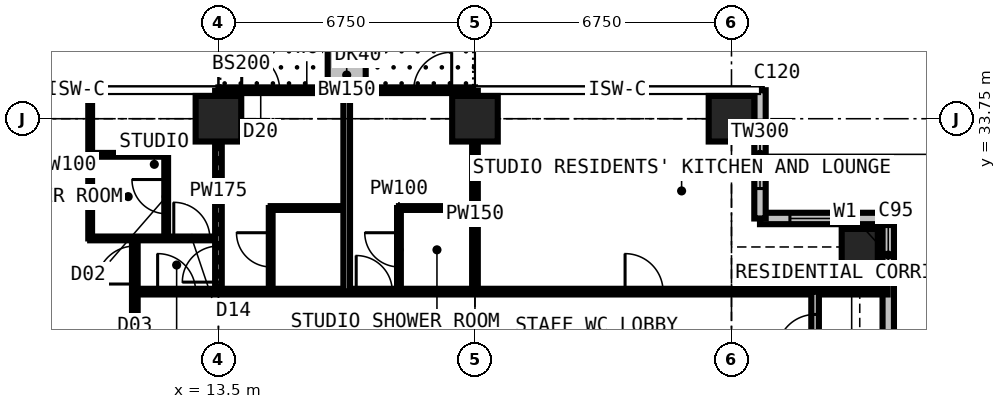
"""IFC4 building model, lengths in metres.
Left out: names, types, materials, properties, quantities, classifications, styles, units other than length and angle.
Written with IfcOpenShell. Run it as: python <this file> out.ifc"""

import sys

from ifc_helpers import new_model, si_unit, direction, frame, frame_2d, origin, origin_2d, place, context, subcontext, project, spatial, rectangle, extrude, element, fill, save


model = new_model("IFC4")
c1 = context("Model", 3, precision=1e-05, world=origin(), true_north=direction((0.0, 1.0)))
c2 = subcontext(c1, "Body", "Model", "MODEL_VIEW")
j1 = project(units=[si_unit("LENGTHUNIT", "METRE"), si_unit("PLANEANGLEUNIT", "RADIAN")], contexts=[c1])
p1 = place(None, origin())
s1 = spatial("IfcSite", under=j1, at=p1, CompositionType="ELEMENT")
p2 = place(p1, origin())
s2 = spatial("IfcBuilding", under=s1, at=p2, CompositionType="ELEMENT")
p3 = place(p2, frame((0.0, 0.0, 192.6)))
s3 = spatial("IfcBuildingStorey", under=s2, at=p3, CompositionType="ELEMENT", Elevation=192.6)
for number, where, z_axis, x_axis in (
    (1, (13.5, 33.75, 0.0), (0.0, 0.0, 1.0), (1.0, 0.0, 0.0)),
    (2, (20.25, 33.75, 0.0), (0.0, 0.0, 1.0), (1.0, 0.0, 0.0)),
    (3, (27.0, 33.75, 0.0), (0.0, 0.0, 1.0), (1.0, 0.0, 0.0)),
):
    element("IfcColumn", number, at=place(p3, frame(where, z_axis=z_axis, x_axis=x_axis)), inside=s3, PredefinedType="COLUMN", context=c2, shape_type="SweptSolid", body=[
        extrude(rectangle(XDim=1.2, YDim=1.2, at=origin_2d()), origin(), (0.0, 0.0, 1.0), 3.6),
    ])
p4 = place(p3, frame((30.375, 30.375, 0.0), z_axis=(0.0, 0.0, 1.0), x_axis=(1.0, 0.0, 0.0)))
e4 = element("IfcColumn", 4, at=p4, inside=s3, PredefinedType="COLUMN", context=c2, shape_type="SweptSolid", body=[
    extrude(rectangle(XDim=0.95, YDim=0.95, at=origin_2d()), origin(), (0.0, 0.0, 1.0), 3.6),
])
p5 = place(p3, frame((31.125, 27.75, 0.0), z_axis=(0.0, 0.0, 1.0), x_axis=(0.0, 1.0, 0.0)))
e5 = element("IfcWall", 5, at=p5, inside=s3, PredefinedType="SOLIDWALL", context=c2, shape_type="SweptSolid", body=[
    extrude(rectangle(XDim=3.375, YDim=0.3, at=frame_2d((1.688, 0.0))), origin(), (0.0, 0.0, 1.0), 3.375),
])
p6 = place(p5, frame((1.663, 0.0, 0.9)))
e6 = element("IfcOpeningElement", 6, at=p6, cuts=e5, PredefinedType="OPENING", context=c2, shape_type="SweptSolid", body=[
    extrude(rectangle(XDim=1.5, YDim=1.8, at=frame_2d((0.75, 0.9))), frame((0.0, 0.16, 0.0), z_axis=(0.0, -1.0, 0.0), x_axis=(1.0, 0.0, 0.0)), (0.0, 0.0, 1.0), 0.32),
])
p7 = place(p3, frame((31.125, 31.125, 0.0), z_axis=(0.0, 0.0, 1.0), x_axis=(-1.0, 0.0, 0.0)))
e7 = element("IfcWall", 7, at=p7, inside=s3, PredefinedType="SOLIDWALL", context=c2, shape_type="SweptSolid", body=[
    extrude(rectangle(XDim=3.375, YDim=0.3, at=frame_2d((1.688, 0.0))), origin(), (0.0, 0.0, 1.0), 3.375),
])
p8 = place(p7, frame((0.788, 0.0, 0.6)))
e8 = element("IfcOpeningElement", 8, at=p8, cuts=e7, PredefinedType="OPENING", context=c2, shape_type="SweptSolid", body=[
    extrude(rectangle(XDim=1.8, YDim=2.1, at=frame_2d((0.9, 1.05))), frame((0.0, 0.16, 0.0), z_axis=(0.0, -1.0, 0.0), x_axis=(1.0, 0.0, 0.0)), (0.0, 0.0, 1.0), 0.32),
])
p9 = place(p3, frame((27.75, 31.125, 0.0), z_axis=(0.0, 0.0, 1.0), x_axis=(0.0, 1.0, 0.0)))
e9 = element("IfcWall", 9, at=p9, inside=s3, PredefinedType="SOLIDWALL", context=c2, shape_type="SweptSolid", body=[
    extrude(rectangle(XDim=3.375, YDim=0.3, at=frame_2d((1.688, 0.0))), origin(), (0.0, 0.0, 1.0), 3.375),
])
p10 = place(p9, frame((0.788, 0.0, 0.6)))
e10 = element("IfcOpeningElement", 10, at=p10, cuts=e9, PredefinedType="OPENING", context=c2, shape_type="SweptSolid", body=[
    extrude(rectangle(XDim=1.8, YDim=2.1, at=frame_2d((0.9, 1.05))), frame((0.0, 0.16, 0.0), z_axis=(0.0, -1.0, 0.0), x_axis=(1.0, 0.0, 0.0)), (0.0, 0.0, 1.0), 0.32),
])
p11 = place(p3, frame((13.5, 34.5, 0.0), z_axis=(0.0, 0.0, 1.0), x_axis=(1.0, 0.0, 0.0)))
e11 = element("IfcWall", 11, at=p11, inside=s3, PredefinedType="SOLIDWALL", context=c2, shape_type="SweptSolid", body=[
    extrude(rectangle(XDim=6.75, YDim=0.15, at=frame_2d((3.375, 0.0))), origin(), (0.0, 0.0, 1.0), 3.375),
])
p12 = place(p11, frame((0.613, 0.0, 0.0)))
e12 = element("IfcOpeningElement", 12, at=p12, cuts=e11, PredefinedType="OPENING", context=c2, shape_type="SweptSolid", body=[
    extrude(rectangle(XDim=1.0, YDim=2.2, at=frame_2d((0.5, 1.1))), frame((0.0, 0.085, 0.0), z_axis=(0.0, -1.0, 0.0), x_axis=(1.0, 0.0, 0.0)), (0.0, 0.0, 1.0), 0.17),
])
p13 = place(p11, frame((1.725, 0.0, 0.9)))
e13 = element("IfcOpeningElement", 13, at=p13, cuts=e11, PredefinedType="OPENING", context=c2, shape_type="SweptSolid", body=[
    extrude(rectangle(XDim=1.2, YDim=1.8, at=frame_2d((0.6, 0.9))), frame((0.0, 0.085, 0.0), z_axis=(0.0, -1.0, 0.0), x_axis=(1.0, 0.0, 0.0)), (0.0, 0.0, 1.0), 0.17),
])
p14 = place(p11, frame((5.137, 0.0, 0.0)))
e14 = element("IfcOpeningElement", 14, at=p14, cuts=e11, PredefinedType="OPENING", context=c2, shape_type="SweptSolid", body=[
    extrude(rectangle(XDim=1.0, YDim=2.2, at=frame_2d((0.5, 1.1))), frame((0.0, 0.085, 0.0), z_axis=(0.0, -1.0, 0.0), x_axis=(1.0, 0.0, 0.0)), (0.0, 0.0, 1.0), 0.17),
])
p15 = place(p11, frame((3.825, 0.0, 0.9)))
e15 = element("IfcOpeningElement", 15, at=p15, cuts=e11, PredefinedType="OPENING", context=c2, shape_type="SweptSolid", body=[
    extrude(rectangle(XDim=1.2, YDim=1.8, at=frame_2d((0.6, 0.9))), frame((0.0, 0.085, 0.0), z_axis=(0.0, -1.0, 0.0), x_axis=(1.0, 0.0, 0.0)), (0.0, 0.0, 1.0), 0.17),
])
p16 = place(p3, frame((16.875, 34.6, 0.0), z_axis=(0.0, 0.0, 1.0), x_axis=(0.0, 1.0, 0.0)))
e16 = element("IfcWall", 16, at=p16, inside=s3, PredefinedType="USERDEFINED", context=c2, shape_type="SweptSolid", body=[
    extrude(rectangle(XDim=2.2, YDim=1.0, at=frame_2d((1.1, 0.0))), origin(), (0.0, 0.0, 1.0), 0.9),
])
p17 = place(p3, frame((10.125, 30.6, 0.0), z_axis=(0.0, 0.0, 1.0), x_axis=(0.0, 1.0, 0.0)))
e17 = element("IfcWall", 17, at=p17, inside=s3, PredefinedType="PARTITIONING", context=c2, shape_type="SweptSolid", body=[
    extrude(rectangle(XDim=3.884, YDim=0.1, at=frame_2d((1.942, 0.0))), origin(), (0.0, 0.0, 1.0), 3.375),
])
p18 = place(p3, frame((10.125, 30.6, 0.0), z_axis=(0.0, 0.0, 1.0), x_axis=(1.0, 0.0, 0.0)))
e18 = element("IfcWall", 18, at=p18, inside=s3, PredefinedType="PARTITIONING", context=c2, shape_type="SweptSolid", body=[
    extrude(rectangle(XDim=3.375, YDim=0.1, at=frame_2d((1.688, 0.0))), origin(), (0.0, 0.0, 1.0), 3.375),
])
p19 = place(p18, frame((2.2, 0.0, 0.0)))
e19 = element("IfcOpeningElement", 19, at=p19, cuts=e18, PredefinedType="OPENING", context=c2, shape_type="SweptSolid", body=[
    extrude(rectangle(XDim=0.95, YDim=2.2, at=frame_2d((0.475, 1.1))), frame((0.0, 0.06, 0.0), z_axis=(0.0, -1.0, 0.0), x_axis=(1.0, 0.0, 0.0)), (0.0, 0.0, 1.0), 0.12),
])
p20 = place(p3, frame((10.125, 32.8, 0.0), z_axis=(0.0, 0.0, 1.0), x_axis=(1.0, 0.0, 0.0)))
e20 = element("IfcWall", 20, at=p20, inside=s3, PredefinedType="PARTITIONING", context=c2, shape_type="SweptSolid", body=[
    extrude(rectangle(XDim=2.0, YDim=0.1, at=frame_2d((1.0, 0.0))), origin(), (0.0, 0.0, 1.0), 3.375),
])
p21 = place(p3, frame((11.3, 11.3, 0.0), z_axis=(0.0, 0.0, 1.0), x_axis=(0.0, 1.0, 0.0)))
e21 = element("IfcWall", 21, at=p21, inside=s3, PredefinedType="PARTITIONING", context=c2, shape_type="SweptSolid", body=[
    extrude(rectangle(XDim=19.3, YDim=0.15, at=frame_2d((9.65, 0.0))), origin(), (0.0, 0.0, 1.0), 3.375),
])
p22 = place(p21, frame((18.1, 0.0, 0.0)))
e22 = element("IfcOpeningElement", 22, at=p22, cuts=e21, PredefinedType="OPENING", context=c2, shape_type="SweptSolid", body=[
    extrude(rectangle(XDim=1.0, YDim=2.2, at=frame_2d((0.5, 1.1))), frame((0.0, 0.085, 0.0), z_axis=(0.0, -1.0, 0.0), x_axis=(1.0, 0.0, 0.0)), (0.0, 0.0, 1.0), 0.17),
])
p23 = place(p21, frame((10.137, 0.0, 0.0)))
e23 = element("IfcOpeningElement", 23, at=p23, cuts=e21, PredefinedType="OPENING", context=c2, shape_type="SweptSolid", body=[
    extrude(rectangle(XDim=1.0, YDim=2.2, at=frame_2d((0.5, 1.1))), frame((0.0, 0.085, 0.0), z_axis=(0.0, -1.0, 0.0), x_axis=(1.0, 0.0, 0.0)), (0.0, 0.0, 1.0), 0.17),
])
p24 = place(p3, frame((11.3, 29.2, 0.0), z_axis=(0.0, 0.0, 1.0), x_axis=(1.0, 0.0, 0.0)))
e24 = element("IfcWall", 24, at=p24, inside=s3, PredefinedType="PARTITIONING", context=c2, shape_type="SweptSolid", body=[
    extrude(rectangle(XDim=19.809, YDim=0.15, at=frame_2d((9.904, 0.0))), origin(), (0.0, 0.0, 1.0), 3.375),
])
p25 = place(p24, frame((12.9, 0.0, 0.0)))
e25 = element("IfcOpeningElement", 25, at=p25, cuts=e24, PredefinedType="OPENING", context=c2, shape_type="SweptSolid", body=[
    extrude(rectangle(XDim=1.0, YDim=2.2, at=frame_2d((0.5, 1.1))), frame((0.0, 0.085, 0.0), z_axis=(0.0, -1.0, 0.0), x_axis=(1.0, 0.0, 0.0)), (0.0, 0.0, 1.0), 0.17),
])
p26 = place(p24, frame((5.825, 0.0, 0.0)))
e26 = element("IfcOpeningElement", 26, at=p26, cuts=e24, PredefinedType="OPENING", context=c2, shape_type="SweptSolid", body=[
    extrude(rectangle(XDim=0.95, YDim=2.2, at=frame_2d((0.475, 1.1))), frame((0.0, 0.085, 0.0), z_axis=(0.0, -1.0, 0.0), x_axis=(1.0, 0.0, 0.0)), (0.0, 0.0, 1.0), 0.17),
])
p27 = place(p24, frame((0.6, 0.0, 0.0)))
e27 = element("IfcOpeningElement", 27, at=p27, cuts=e24, PredefinedType="OPENING", context=c2, shape_type="SweptSolid", body=[
    extrude(rectangle(XDim=1.0, YDim=2.2, at=frame_2d((0.5, 1.1))), frame((0.0, 0.085, 0.0), z_axis=(0.0, -1.0, 0.0), x_axis=(1.0, 0.0, 0.0)), (0.0, 0.0, 1.0), 0.17),
])
p28 = place(p3, frame((12.125, 30.6, 0.0), z_axis=(0.0, 0.0, 1.0), x_axis=(0.0, 1.0, 0.0)))
e28 = element("IfcWall", 28, at=p28, inside=s3, PredefinedType="PARTITIONING", context=c2, shape_type="SweptSolid", body=[
    extrude(rectangle(XDim=2.2, YDim=0.1, at=frame_2d((1.1, 0.0))), origin(), (0.0, 0.0, 1.0), 3.375),
])
p29 = place(p28, frame((0.65, 0.0, 0.0)))
e29 = element("IfcOpeningElement", 29, at=p29, cuts=e28, PredefinedType="OPENING", context=c2, shape_type="SweptSolid", body=[
    extrude(rectangle(XDim=0.9, YDim=2.2, at=frame_2d((0.45, 1.1))), frame((0.0, 0.06, 0.0), z_axis=(0.0, -1.0, 0.0), x_axis=(1.0, 0.0, 0.0)), (0.0, 0.0, 1.0), 0.12),
])
p30 = place(p3, frame((13.5, 29.2, 0.0), z_axis=(0.0, 0.0, 1.0), x_axis=(0.0, 1.0, 0.0)))
e30 = element("IfcWall", 30, at=p30, inside=s3, PredefinedType="PARTITIONING", context=c2, shape_type="SweptSolid", body=[
    extrude(rectangle(XDim=5.284, YDim=0.175, at=frame_2d((2.642, 0.0))), origin(), (0.0, 0.0, 1.0), 2.806),
])
p31 = place(p30, frame((0.25, 0.0, 0.0)))
e31 = element("IfcOpeningElement", 31, at=p31, cuts=e30, PredefinedType="OPENING", context=c2, shape_type="SweptSolid", body=[
    extrude(rectangle(XDim=0.95, YDim=2.2, at=frame_2d((0.475, 1.1))), frame((0.0, 0.097, 0.0), z_axis=(0.0, -1.0, 0.0), x_axis=(1.0, 0.0, 0.0)), (0.0, 0.0, 1.0), 0.195),
])
p32 = place(p3, frame((14.875, 29.2, 0.0), z_axis=(0.0, 0.0, 1.0), x_axis=(0.0, 1.0, 0.0)))
e32 = element("IfcWall", 32, at=p32, inside=s3, PredefinedType="PARTITIONING", context=c2, shape_type="SweptSolid", body=[
    extrude(rectangle(XDim=2.2, YDim=0.1, at=frame_2d((1.1, 0.0))), origin(), (0.0, 0.0, 1.0), 3.375),
])
p33 = place(p32, frame((0.65, 0.0, 0.0)))
e33 = element("IfcOpeningElement", 33, at=p33, cuts=e32, PredefinedType="OPENING", context=c2, shape_type="SweptSolid", body=[
    extrude(rectangle(XDim=0.9, YDim=2.2, at=frame_2d((0.45, 1.1))), frame((0.0, 0.06, 0.0), z_axis=(0.0, -1.0, 0.0), x_axis=(1.0, 0.0, 0.0)), (0.0, 0.0, 1.0), 0.12),
])
p34 = place(p3, frame((14.875, 31.4, 0.0), z_axis=(0.0, 0.0, 1.0), x_axis=(1.0, 0.0, 0.0)))
e34 = element("IfcWall", 34, at=p34, inside=s3, PredefinedType="PARTITIONING", context=c2, shape_type="SweptSolid", body=[
    extrude(rectangle(XDim=2.0, YDim=0.1, at=frame_2d((1.0, 0.0))), origin(), (0.0, 0.0, 1.0), 3.375),
])
p35 = place(p3, frame((16.875, 29.2, 0.0), z_axis=(0.0, 0.0, 1.0), x_axis=(0.0, 1.0, 0.0)))
e35 = element("IfcWall", 35, at=p35, inside=s3, PredefinedType="PARTITIONING", context=c2, shape_type="SweptSolid", body=[
    extrude(rectangle(XDim=5.284, YDim=0.175, at=frame_2d((2.642, 0.0))), origin(), (0.0, 0.0, 1.0), 3.375),
])
p36 = place(p3, frame((18.25, 29.2, 0.0), z_axis=(0.0, 0.0, 1.0), x_axis=(0.0, 1.0, 0.0)))
e36 = element("IfcWall", 36, at=p36, inside=s3, PredefinedType="PARTITIONING", context=c2, shape_type="SweptSolid", body=[
    extrude(rectangle(XDim=2.2, YDim=0.1, at=frame_2d((1.1, 0.0))), origin(), (0.0, 0.0, 1.0), 3.375),
])
p37 = place(p36, frame((0.65, 0.0, 0.0)))
e37 = element("IfcOpeningElement", 37, at=p37, cuts=e36, PredefinedType="OPENING", context=c2, shape_type="SweptSolid", body=[
    extrude(rectangle(XDim=0.9, YDim=2.2, at=frame_2d((0.45, 1.1))), frame((0.0, 0.06, 0.0), z_axis=(0.0, -1.0, 0.0), x_axis=(1.0, 0.0, 0.0)), (0.0, 0.0, 1.0), 0.12),
])
p38 = place(p3, frame((18.25, 31.4, 0.0), z_axis=(0.0, 0.0, 1.0), x_axis=(1.0, 0.0, 0.0)))
e38 = element("IfcWall", 38, at=p38, inside=s3, PredefinedType="PARTITIONING", context=c2, shape_type="SweptSolid", body=[
    extrude(rectangle(XDim=2.0, YDim=0.1, at=frame_2d((1.0, 0.0))), origin(), (0.0, 0.0, 1.0), 3.375),
])
p39 = place(p3, frame((20.25, 29.2, 0.0), z_axis=(0.0, 0.0, 1.0), x_axis=(0.0, 1.0, 0.0)))
e39 = element("IfcWall", 39, at=p39, inside=s3, PredefinedType="PARTITIONING", context=c2, shape_type="SweptSolid", body=[
    extrude(rectangle(XDim=5.284, YDim=0.15, at=frame_2d((2.642, 0.0))), origin(), (0.0, 0.0, 1.0), 2.806),
])
p40 = place(p3, frame((29.2, 11.3, 0.0), z_axis=(0.0, 0.0, 1.0), x_axis=(0.0, 1.0, 0.0)))
e40 = element("IfcWall", 40, at=p40, inside=s3, PredefinedType="PARTITIONING", context=c2, shape_type="SweptSolid", body=[
    extrude(rectangle(XDim=17.9, YDim=0.2, at=frame_2d((8.95, 0.0))), origin(), (0.0, 0.0, 1.0), 3.375),
])
p41 = place(p40, frame((5.775, 0.0, 0.0)))
e41 = element("IfcOpeningElement", 41, at=p41, cuts=e40, PredefinedType="OPENING", context=c2, shape_type="SweptSolid", body=[
    extrude(rectangle(XDim=0.95, YDim=2.2, at=frame_2d((0.475, 1.1))), frame((0.0, 0.11, 0.0), z_axis=(0.0, -1.0, 0.0), x_axis=(1.0, 0.0, 0.0)), (0.0, 0.0, 1.0), 0.22),
])
p42 = place(p40, frame((9.2, 0.0, 0.0)))
e42 = element("IfcOpeningElement", 42, at=p42, cuts=e40, PredefinedType="OPENING", context=c2, shape_type="SweptSolid", body=[
    extrude(rectangle(XDim=0.95, YDim=2.2, at=frame_2d((0.475, 1.1))), frame((0.0, 0.11, 0.0), z_axis=(0.0, -1.0, 0.0), x_axis=(1.0, 0.0, 0.0)), (0.0, 0.0, 1.0), 0.22),
])
p43 = place(p40, frame((12.575, 0.0, 0.0)))
e43 = element("IfcOpeningElement", 43, at=p43, cuts=e40, PredefinedType="OPENING", context=c2, shape_type="SweptSolid", body=[
    extrude(rectangle(XDim=0.95, YDim=2.2, at=frame_2d((0.475, 1.1))), frame((0.0, 0.11, 0.0), z_axis=(0.0, -1.0, 0.0), x_axis=(1.0, 0.0, 0.0)), (0.0, 0.0, 1.0), 0.22),
])
p44 = place(p40, frame((16.3, 0.0, 0.0)))
e44 = element("IfcOpeningElement", 44, at=p44, cuts=e40, PredefinedType="OPENING", context=c2, shape_type="SweptSolid", body=[
    extrude(rectangle(XDim=1.0, YDim=2.2, at=frame_2d((0.5, 1.1))), frame((0.0, 0.11, 0.0), z_axis=(0.0, -1.0, 0.0), x_axis=(1.0, 0.0, 0.0)), (0.0, 0.0, 1.0), 0.22),
])
p45 = place(p6, origin())
e45 = element("IfcWindow", 45, at=p45, inside=s3, PartitioningType="SINGLE_PANEL", PredefinedType="WINDOW", context=c2, shape_type="SweptSolid", body=[
    extrude(rectangle(XDim=1.5, YDim=1.8, at=frame_2d((0.75, 0.9))), frame((0.0, 0.03, 0.0), z_axis=(0.0, -1.0, 0.0), x_axis=(1.0, 0.0, 0.0)), (0.0, 0.0, 1.0), 0.06),
])
fill(e6, e45)
p46 = place(p8, origin())
e46 = element("IfcWindow", 46, at=p46, inside=s3, PartitioningType="SINGLE_PANEL", PredefinedType="WINDOW", context=c2, shape_type="SweptSolid", body=[
    extrude(rectangle(XDim=1.8, YDim=2.1, at=frame_2d((0.9, 1.05))), frame((0.0, 0.03, 0.0), z_axis=(0.0, -1.0, 0.0), x_axis=(1.0, 0.0, 0.0)), (0.0, 0.0, 1.0), 0.06),
])
fill(e8, e46)
p47 = place(p10, origin())
e47 = element("IfcWindow", 47, at=p47, inside=s3, PartitioningType="SINGLE_PANEL", PredefinedType="WINDOW", context=c2, shape_type="SweptSolid", body=[
    extrude(rectangle(XDim=1.8, YDim=2.1, at=frame_2d((0.9, 1.05))), frame((0.0, 0.03, 0.0), z_axis=(0.0, -1.0, 0.0), x_axis=(1.0, 0.0, 0.0)), (0.0, 0.0, 1.0), 0.06),
])
fill(e10, e47)
p48 = place(p12, origin())
e48 = element("IfcDoor", 48, at=p48, inside=s3, OperationType="SINGLE_SWING_LEFT", PredefinedType="DOOR", context=c2, shape_type="SweptSolid", body=[
    extrude(rectangle(XDim=1.0, YDim=2.2, at=frame_2d((0.5, 1.1))), frame((0.0, 0.025, 0.0), z_axis=(0.0, -1.0, 0.0), x_axis=(1.0, 0.0, 0.0)), (0.0, 0.0, 1.0), 0.05),
])
fill(e12, e48)
p49 = place(p13, origin())
e49 = element("IfcWindow", 49, at=p49, inside=s3, PartitioningType="SINGLE_PANEL", PredefinedType="WINDOW", context=c2, shape_type="SweptSolid", body=[
    extrude(rectangle(XDim=1.2, YDim=1.8, at=frame_2d((0.6, 0.9))), frame((0.0, 0.03, 0.0), z_axis=(0.0, -1.0, 0.0), x_axis=(1.0, 0.0, 0.0)), (0.0, 0.0, 1.0), 0.06),
])
fill(e13, e49)
p50 = place(p14, origin())
e50 = element("IfcDoor", 50, at=p50, inside=s3, OperationType="SINGLE_SWING_RIGHT", PredefinedType="DOOR", context=c2, shape_type="SweptSolid", body=[
    extrude(rectangle(XDim=1.0, YDim=2.2, at=frame_2d((0.5, 1.1))), frame((0.0, 0.025, 0.0), z_axis=(0.0, -1.0, 0.0), x_axis=(1.0, 0.0, 0.0)), (0.0, 0.0, 1.0), 0.05),
])
fill(e14, e50)
p51 = place(p15, origin())
e51 = element("IfcWindow", 51, at=p51, inside=s3, PartitioningType="SINGLE_PANEL", PredefinedType="WINDOW", context=c2, shape_type="SweptSolid", body=[
    extrude(rectangle(XDim=1.2, YDim=1.8, at=frame_2d((0.6, 0.9))), frame((0.0, 0.03, 0.0), z_axis=(0.0, -1.0, 0.0), x_axis=(1.0, 0.0, 0.0)), (0.0, 0.0, 1.0), 0.06),
])
fill(e15, e51)
p52 = place(p44, origin())
e52 = element("IfcDoor", 52, at=p52, inside=s3, OperationType="SINGLE_SWING_LEFT", PredefinedType="DOOR", context=c2, shape_type="SweptSolid", body=[
    extrude(rectangle(XDim=1.0, YDim=2.2, at=frame_2d((0.5, 1.1))), frame((0.0, 0.025, 0.0), z_axis=(0.0, -1.0, 0.0), x_axis=(1.0, 0.0, 0.0)), (0.0, 0.0, 1.0), 0.05),
])
fill(e44, e52)
p53 = place(p25, origin())
e53 = element("IfcDoor", 53, at=p53, inside=s3, OperationType="SINGLE_SWING_LEFT", PredefinedType="DOOR", context=c2, shape_type="SweptSolid", body=[
    extrude(rectangle(XDim=1.0, YDim=2.2, at=frame_2d((0.5, 1.1))), frame((0.0, 0.025, 0.0), z_axis=(0.0, -1.0, 0.0), x_axis=(1.0, 0.0, 0.0)), (0.0, 0.0, 1.0), 0.05),
])
fill(e25, e53)
p54 = place(p19, origin())
e54 = element("IfcDoor", 54, at=p54, inside=s3, OperationType="SINGLE_SWING_LEFT", PredefinedType="DOOR", context=c2, shape_type="SweptSolid", body=[
    extrude(rectangle(XDim=0.95, YDim=2.2, at=frame_2d((0.475, 1.1))), frame((0.0, 0.025, 0.0), z_axis=(0.0, -1.0, 0.0), x_axis=(1.0, 0.0, 0.0)), (0.0, 0.0, 1.0), 0.05),
])
fill(e19, e54)
p55 = place(p29, origin())
e55 = element("IfcDoor", 55, at=p55, inside=s3, OperationType="SINGLE_SWING_RIGHT", PredefinedType="DOOR", context=c2, shape_type="SweptSolid", body=[
    extrude(rectangle(XDim=0.9, YDim=2.2, at=frame_2d((0.45, 1.1))), frame((0.0, 0.025, 0.0), z_axis=(0.0, -1.0, 0.0), x_axis=(1.0, 0.0, 0.0)), (0.0, 0.0, 1.0), 0.05),
])
fill(e29, e55)
p56 = place(p31, origin())
e56 = element("IfcDoor", 56, at=p56, inside=s3, OperationType="SINGLE_SWING_LEFT", PredefinedType="DOOR", context=c2, shape_type="SweptSolid", body=[
    extrude(rectangle(XDim=0.95, YDim=2.2, at=frame_2d((0.475, 1.1))), frame((0.0, 0.025, 0.0), z_axis=(0.0, -1.0, 0.0), x_axis=(1.0, 0.0, 0.0)), (0.0, 0.0, 1.0), 0.05),
])
fill(e31, e56)
p57 = place(p33, origin())
e57 = element("IfcDoor", 57, at=p57, inside=s3, OperationType="SINGLE_SWING_RIGHT", PredefinedType="DOOR", context=c2, shape_type="SweptSolid", body=[
    extrude(rectangle(XDim=0.9, YDim=2.2, at=frame_2d((0.45, 1.1))), frame((0.0, 0.025, 0.0), z_axis=(0.0, -1.0, 0.0), x_axis=(1.0, 0.0, 0.0)), (0.0, 0.0, 1.0), 0.05),
])
fill(e33, e57)
p58 = place(p26, origin())
e58 = element("IfcDoor", 58, at=p58, inside=s3, OperationType="SINGLE_SWING_LEFT", PredefinedType="DOOR", context=c2, shape_type="SweptSolid", body=[
    extrude(rectangle(XDim=0.95, YDim=2.2, at=frame_2d((0.475, 1.1))), frame((0.0, 0.025, 0.0), z_axis=(0.0, -1.0, 0.0), x_axis=(1.0, 0.0, 0.0)), (0.0, 0.0, 1.0), 0.05),
])
fill(e26, e58)
p59 = place(p37, origin())
e59 = element("IfcDoor", 59, at=p59, inside=s3, OperationType="SINGLE_SWING_RIGHT", PredefinedType="DOOR", context=c2, shape_type="SweptSolid", body=[
    extrude(rectangle(XDim=0.9, YDim=2.2, at=frame_2d((0.45, 1.1))), frame((0.0, 0.025, 0.0), z_axis=(0.0, -1.0, 0.0), x_axis=(1.0, 0.0, 0.0)), (0.0, 0.0, 1.0), 0.05),
])
fill(e37, e59)
p60 = place(p27, origin())
e60 = element("IfcDoor", 60, at=p60, inside=s3, OperationType="SINGLE_SWING_LEFT", PredefinedType="DOOR", context=c2, shape_type="SweptSolid", body=[
    extrude(rectangle(XDim=1.0, YDim=2.2, at=frame_2d((0.5, 1.1))), frame((0.0, 0.025, 0.0), z_axis=(0.0, -1.0, 0.0), x_axis=(1.0, 0.0, 0.0)), (0.0, 0.0, 1.0), 0.05),
])
fill(e27, e60)
p61 = place(p22, origin())
e61 = element("IfcDoor", 61, at=p61, inside=s3, OperationType="SINGLE_SWING_LEFT", PredefinedType="DOOR", context=c2, shape_type="SweptSolid", body=[
    extrude(rectangle(XDim=1.0, YDim=2.2, at=frame_2d((0.5, 1.1))), frame((0.0, 0.025, 0.0), z_axis=(0.0, -1.0, 0.0), x_axis=(1.0, 0.0, 0.0)), (0.0, 0.0, 1.0), 0.05),
])
fill(e22, e61)
save(model, sys.argv[1])
